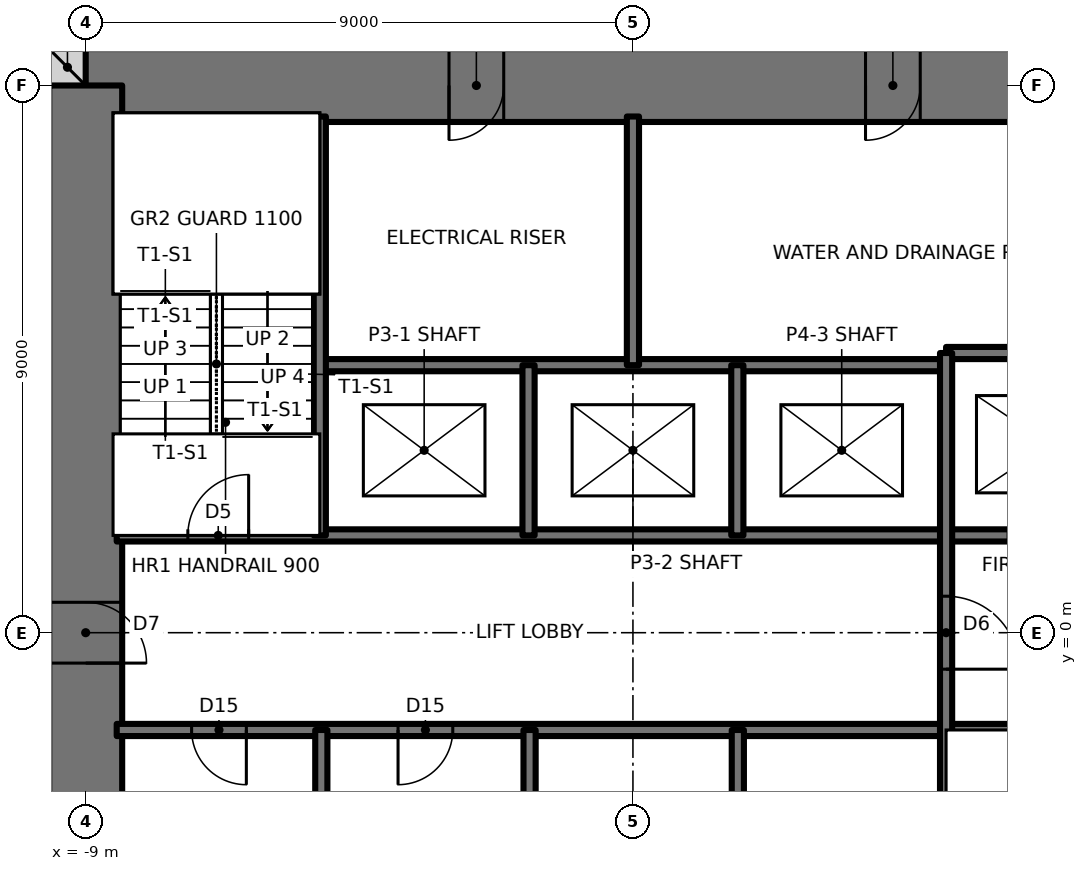
"""IFC4 building model, lengths in metres.
Left out: names, types, materials, properties, quantities, classifications, styles, units other than length and angle.
Written with IfcOpenShell. Run it as: python <this file> out.ifc"""

import sys

from ifc_helpers import new_model, si_unit, direction, frame, frame_2d, origin, place, context, subcontext, project, spatial, rectangle, extrude, element, fill, save


model = new_model("IFC4")
c1 = context("Model", 3, precision=1e-05, world=origin(), true_north=direction((0.0, 1.0)))
c2 = subcontext(c1, "Body", "Model", "MODEL_VIEW")
j1 = project(units=[si_unit("LENGTHUNIT", "METRE"), si_unit("PLANEANGLEUNIT", "RADIAN")], contexts=[c1])
p1 = place(None, origin())
s1 = spatial("IfcSite", under=j1, at=p1, CompositionType="ELEMENT")
p2 = place(p1, origin())
s2 = spatial("IfcBuilding", under=s1, at=p2, CompositionType="ELEMENT")
p3 = place(p2, frame((0.0, 0.0, 143.5)))
s3 = spatial("IfcBuildingStorey", under=s2, at=p3, CompositionType="ELEMENT", Elevation=143.5)
p4 = place(p3, frame((-9.6, 9.3, 0.0), z_axis=(0.0, 0.0, 1.0), x_axis=(1.0, 0.0, 0.0)))
e1 = element("IfcWall", 1, at=p4, inside=s3, PredefinedType="SOLIDWALL", context=c2, shape_type="SweptSolid", body=[
    extrude(rectangle(XDim=0.6, YDim=0.6, at=frame_2d((0.3, 0.0))), origin(), (0.0, 0.0, 1.0), 6.0),
])
p5 = place(p3, frame((9.0, 9.0, 0.0), z_axis=(0.0, 0.0, 1.0), x_axis=(-1.0, 0.0, 0.0)))
e2 = element("IfcWall", 2, at=p5, inside=s3, PredefinedType="SHEAR", context=c2, shape_type="SweptSolid", body=[
    extrude(rectangle(XDim=18.0, YDim=1.2, at=frame_2d((9.0, 0.0))), origin(), (0.0, 0.0, 1.0), 6.0),
])
p6 = place(p5, frame((11.125, 0.0, 0.0)))
e3 = element("IfcOpeningElement", 3, at=p6, cuts=e2, PredefinedType="OPENING", context=c2, shape_type="SweptSolid", body=[
    extrude(rectangle(XDim=0.9, YDim=2.1, at=frame_2d((0.45, 1.05))), frame((0.0, 0.61, 0.0), z_axis=(0.0, -1.0, 0.0), x_axis=(1.0, 0.0, 0.0)), (0.0, 0.0, 1.0), 1.22),
])
p7 = place(p5, frame((4.275, 0.0, 0.0)))
e4 = element("IfcOpeningElement", 4, at=p7, cuts=e2, PredefinedType="OPENING", context=c2, shape_type="SweptSolid", body=[
    extrude(rectangle(XDim=0.9, YDim=2.1, at=frame_2d((0.45, 1.05))), frame((0.0, 0.61, 0.0), z_axis=(0.0, -1.0, 0.0), x_axis=(1.0, 0.0, 0.0)), (0.0, 0.0, 1.0), 1.22),
])
p8 = place(p3, frame((-9.0, 9.0, 0.0), z_axis=(0.0, 0.0, 1.0), x_axis=(0.0, -1.0, 0.0)))
e5 = element("IfcWall", 5, at=p8, inside=s3, PredefinedType="SHEAR", context=c2, shape_type="SweptSolid", body=[
    extrude(rectangle(XDim=18.0, YDim=1.2, at=frame_2d((9.0, 0.0))), origin(), (0.0, 0.0, 1.0), 6.0),
])
p9 = place(p8, frame((8.5, 0.0, 0.0)))
e6 = element("IfcOpeningElement", 6, at=p9, cuts=e5, PredefinedType="OPENING", context=c2, shape_type="SweptSolid", body=[
    extrude(rectangle(XDim=1.0, YDim=2.1, at=frame_2d((0.5, 1.05))), frame((0.0, 0.61, 0.0), z_axis=(0.0, -1.0, 0.0), x_axis=(1.0, 0.0, 0.0)), (0.0, 0.0, 1.0), 1.22),
])
p10 = place(p3, frame((-8.49, -1.6, 0.0), z_axis=(0.0, 0.0, 1.0), x_axis=(1.0, 0.0, 0.0)))
e7 = element("IfcWall", 7, at=p10, inside=s3, PredefinedType="SOLIDWALL", context=c2, shape_type="SweptSolid", body=[
    extrude(rectangle(XDim=16.98, YDim=0.2, at=frame_2d((8.49, 0.0))), origin(), (0.0, 0.0, 1.0), 6.0),
])
p11 = place(p10, frame((14.81, 0.0, 0.0)))
e8 = element("IfcOpeningElement", 8, at=p11, cuts=e7, PredefinedType="OPENING", context=c2, shape_type="SweptSolid", body=[
    extrude(rectangle(XDim=1.0, YDim=2.1, at=frame_2d((0.5, 1.05))), frame((0.0, 0.11, 0.0), z_axis=(0.0, -1.0, 0.0), x_axis=(1.0, 0.0, 0.0)), (0.0, 0.0, 1.0), 0.22),
])
p12 = place(p10, frame((1.232, 0.0, 0.0)))
e9 = element("IfcOpeningElement", 9, at=p12, cuts=e7, PredefinedType="OPENING", context=c2, shape_type="SweptSolid", body=[
    extrude(rectangle(XDim=0.9, YDim=2.1, at=frame_2d((0.45, 1.05))), frame((0.0, 0.11, 0.0), z_axis=(0.0, -1.0, 0.0), x_axis=(1.0, 0.0, 0.0)), (0.0, 0.0, 1.0), 0.22),
])
p13 = place(p10, frame((4.627, 0.0, 0.0)))
e10 = element("IfcOpeningElement", 10, at=p13, cuts=e7, PredefinedType="OPENING", context=c2, shape_type="SweptSolid", body=[
    extrude(rectangle(XDim=0.9, YDim=2.1, at=frame_2d((0.45, 1.05))), frame((0.0, 0.11, 0.0), z_axis=(0.0, -1.0, 0.0), x_axis=(1.0, 0.0, 0.0)), (0.0, 0.0, 1.0), 0.22),
])
p14 = place(p3, frame((-8.49, 1.6, 0.0), z_axis=(0.0, 0.0, 1.0), x_axis=(1.0, 0.0, 0.0)))
e11 = element("IfcWall", 11, at=p14, inside=s3, PredefinedType="SOLIDWALL", context=c2, shape_type="SweptSolid", body=[
    extrude(rectangle(XDim=16.98, YDim=0.2, at=frame_2d((8.49, 0.0))), origin(), (0.0, 0.0, 1.0), 6.0),
])
p15 = place(p14, frame((1.17, 0.0, 0.0)))
e12 = element("IfcOpeningElement", 12, at=p15, cuts=e11, PredefinedType="OPENING", context=c2, shape_type="SweptSolid", body=[
    extrude(rectangle(XDim=1.0, YDim=2.1, at=frame_2d((0.5, 1.05))), frame((0.0, 0.11, 0.0), z_axis=(0.0, -1.0, 0.0), x_axis=(1.0, 0.0, 0.0)), (0.0, 0.0, 1.0), 0.22),
])
p16 = place(p14, frame((14.66, 0.0, 0.0)))
e13 = element("IfcOpeningElement", 13, at=p16, cuts=e11, PredefinedType="OPENING", context=c2, shape_type="SweptSolid", body=[
    extrude(rectangle(XDim=1.3, YDim=2.1, at=frame_2d((0.65, 1.05))), frame((0.0, 0.11, 0.0), z_axis=(0.0, -1.0, 0.0), x_axis=(1.0, 0.0, 0.0)), (0.0, 0.0, 1.0), 0.22),
])
p17 = place(p3, frame((-5.15, 4.4, 0.0), z_axis=(0.0, 0.0, 1.0), x_axis=(1.0, 0.0, 0.0)))
e14 = element("IfcWall", 14, at=p17, inside=s3, PredefinedType="SOLIDWALL", context=c2, shape_type="SweptSolid", body=[
    extrude(rectangle(XDim=10.3, YDim=0.2, at=frame_2d((5.15, 0.0))), origin(), (0.0, 0.0, 1.0), 6.0),
])
p18 = place(p3, frame((5.15, 4.6, 0.0), z_axis=(0.0, 0.0, 1.0), x_axis=(1.0, 0.0, 0.0)))
e15 = element("IfcWall", 15, at=p18, inside=s3, PredefinedType="SOLIDWALL", context=c2, shape_type="SweptSolid", body=[
    extrude(rectangle(XDim=3.34, YDim=0.2, at=frame_2d((1.67, 0.0))), origin(), (0.0, 0.0, 1.0), 6.0),
])
p19 = place(p3, frame((5.15, -8.49, 0.0), z_axis=(0.0, 0.0, 1.0), x_axis=(0.0, 1.0, 0.0)))
e16 = element("IfcWall", 16, at=p19, inside=s3, PredefinedType="SOLIDWALL", context=c2, shape_type="SweptSolid", body=[
    extrude(rectangle(XDim=13.09, YDim=0.2, at=frame_2d((6.545, 0.0))), origin(), (0.0, 0.0, 1.0), 6.0),
])
p20 = place(p19, frame((7.89, 0.0, 0.0)))
e17 = element("IfcOpeningElement", 17, at=p20, cuts=e16, PredefinedType="OPENING", context=c2, shape_type="SweptSolid", body=[
    extrude(rectangle(XDim=1.2, YDim=2.1, at=frame_2d((0.6, 1.05))), frame((0.0, 0.11, 0.0), z_axis=(0.0, -1.0, 0.0), x_axis=(1.0, 0.0, 0.0)), (0.0, 0.0, 1.0), 0.22),
])
for number, where, z_axis, x_axis in (
    (18, (1.725, -4.4, 0.0), (0.0, 0.0, 1.0), (0.0, 1.0, 0.0)),
    (19, (1.717, 1.6, 0.0), (0.0, 0.0, 1.0), (0.0, 1.0, 0.0)),
):
    element("IfcWall", number, at=place(p3, frame(where, z_axis=z_axis, x_axis=x_axis)), inside=s3, PredefinedType="SOLIDWALL", context=c2, shape_type="SweptSolid", body=[
        extrude(rectangle(XDim=2.8, YDim=0.2, at=frame_2d((1.4, 0.0))), origin(), (0.0, 0.0, 1.0), 6.0),
    ])
p21 = place(p3, frame((0.0, 4.4, 0.0), z_axis=(0.0, 0.0, 1.0), x_axis=(0.0, 1.0, 0.0)))
e20 = element("IfcWall", 20, at=p21, inside=s3, PredefinedType="SOLIDWALL", context=c2, shape_type="SweptSolid", body=[
    extrude(rectangle(XDim=4.09, YDim=0.2, at=frame_2d((2.045, 0.0))), origin(), (0.0, 0.0, 1.0), 6.0),
])
for number, where, z_axis, x_axis in (
    (21, (-1.7, -4.4, 0.0), (0.0, 0.0, 1.0), (0.0, 1.0, 0.0)),
    (22, (-1.717, 1.6, 0.0), (0.0, 0.0, 1.0), (0.0, 1.0, 0.0)),
    (23, (-5.125, -4.4, 0.0), (0.0, 0.0, 1.0), (0.0, 1.0, 0.0)),
):
    element("IfcWall", number, at=place(p3, frame(where, z_axis=z_axis, x_axis=x_axis)), inside=s3, PredefinedType="SOLIDWALL", context=c2, shape_type="SweptSolid", body=[
        extrude(rectangle(XDim=2.8, YDim=0.2, at=frame_2d((1.4, 0.0))), origin(), (0.0, 0.0, 1.0), 6.0),
    ])
p22 = place(p3, frame((-5.15, 1.6, 0.0), z_axis=(0.0, 0.0, 1.0), x_axis=(0.0, 1.0, 0.0)))
e24 = element("IfcWall", 24, at=p22, inside=s3, PredefinedType="SOLIDWALL", context=c2, shape_type="SweptSolid", body=[
    extrude(rectangle(XDim=6.89, YDim=0.2, at=frame_2d((3.445, 0.0))), origin(), (0.0, 0.0, 1.0), 6.0),
])
p23 = place(p15, origin())
e25 = element("IfcDoor", 25, at=p23, inside=s3, OperationType="SINGLE_SWING_RIGHT", PredefinedType="DOOR", context=c2, shape_type="SweptSolid", body=[
    extrude(rectangle(XDim=1.0, YDim=2.1, at=frame_2d((0.5, 1.05))), frame((0.0, 0.025, 0.0), z_axis=(0.0, -1.0, 0.0), x_axis=(1.0, 0.0, 0.0)), (0.0, 0.0, 1.0), 0.05),
])
fill(e12, e25)
p24 = place(p20, frame((1.2, 0.0, 0.0), z_axis=(0.0, 0.0, 1.0), x_axis=(-1.0, 0.0, 0.0)))
e26 = element("IfcDoor", 26, at=p24, inside=s3, OperationType="SINGLE_SWING_RIGHT", PredefinedType="DOOR", context=c2, shape_type="SweptSolid", body=[
    extrude(rectangle(XDim=1.2, YDim=2.1, at=frame_2d((0.6, 1.05))), frame((0.0, 0.025, 0.0), z_axis=(0.0, -1.0, 0.0), x_axis=(1.0, 0.0, 0.0)), (0.0, 0.0, 1.0), 0.05),
])
fill(e17, e26)
p25 = place(p12, frame((0.9, 0.0, 0.0), z_axis=(0.0, 0.0, 1.0), x_axis=(-1.0, 0.0, 0.0)))
e27 = element("IfcDoor", 27, at=p25, inside=s3, OperationType="SINGLE_SWING_LEFT", PredefinedType="DOOR", context=c2, shape_type="SweptSolid", body=[
    extrude(rectangle(XDim=0.9, YDim=2.1, at=frame_2d((0.45, 1.05))), frame((0.0, 0.025, 0.0), z_axis=(0.0, -1.0, 0.0), x_axis=(1.0, 0.0, 0.0)), (0.0, 0.0, 1.0), 0.05),
])
fill(e9, e27)
p26 = place(p13, frame((0.9, 0.0, 0.0), z_axis=(0.0, 0.0, 1.0), x_axis=(-1.0, 0.0, 0.0)))
e28 = element("IfcDoor", 28, at=p26, inside=s3, OperationType="SINGLE_SWING_RIGHT", PredefinedType="DOOR", context=c2, shape_type="SweptSolid", body=[
    extrude(rectangle(XDim=0.9, YDim=2.1, at=frame_2d((0.45, 1.05))), frame((0.0, 0.025, 0.0), z_axis=(0.0, -1.0, 0.0), x_axis=(1.0, 0.0, 0.0)), (0.0, 0.0, 1.0), 0.05),
])
fill(e10, e28)
p27 = place(p9, origin())
e29 = element("IfcDoor", 29, at=p27, inside=s3, OperationType="SINGLE_SWING_RIGHT", PredefinedType="DOOR", context=c2, shape_type="SweptSolid", body=[
    extrude(rectangle(XDim=1.0, YDim=2.1, at=frame_2d((0.5, 1.05))), frame((0.0, 0.025, 0.0), z_axis=(0.0, -1.0, 0.0), x_axis=(1.0, 0.0, 0.0)), (0.0, 0.0, 1.0), 0.05),
])
fill(e6, e29)
p28 = place(p6, origin())
e30 = element("IfcDoor", 30, at=p28, inside=s3, OperationType="SINGLE_SWING_RIGHT", PredefinedType="DOOR", context=c2, shape_type="SweptSolid", body=[
    extrude(rectangle(XDim=0.9, YDim=2.1, at=frame_2d((0.45, 1.05))), frame((0.0, 0.025, 0.0), z_axis=(0.0, -1.0, 0.0), x_axis=(1.0, 0.0, 0.0)), (0.0, 0.0, 1.0), 0.05),
])
fill(e3, e30)
p29 = place(p7, origin())
e31 = element("IfcDoor", 31, at=p29, inside=s3, OperationType="SINGLE_SWING_RIGHT", PredefinedType="DOOR", context=c2, shape_type="SweptSolid", body=[
    extrude(rectangle(XDim=0.9, YDim=2.1, at=frame_2d((0.45, 1.05))), frame((0.0, 0.025, 0.0), z_axis=(0.0, -1.0, 0.0), x_axis=(1.0, 0.0, 0.0)), (0.0, 0.0, 1.0), 0.05),
])
fill(e4, e31)
save(model, sys.argv[1])
